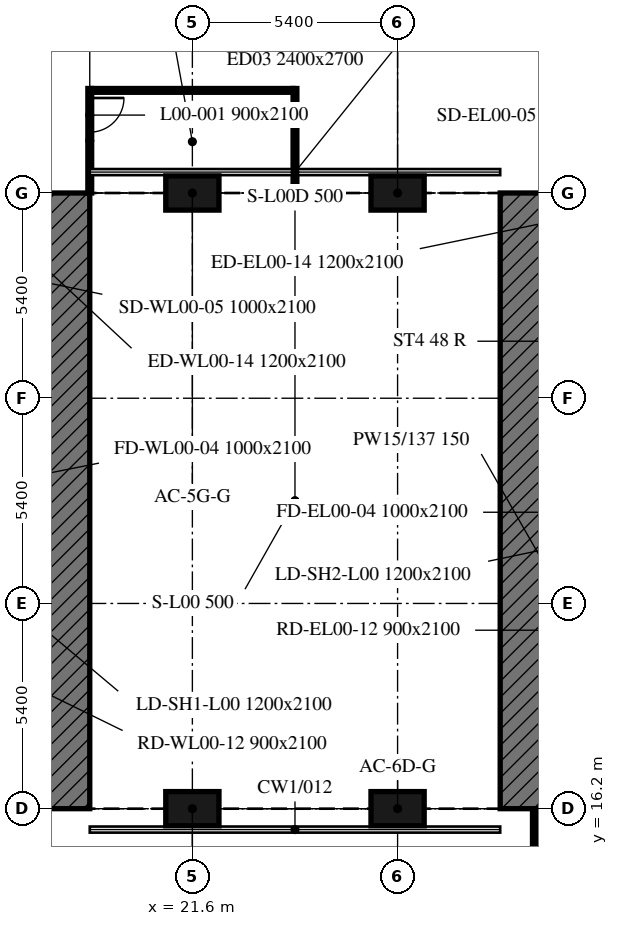
"""IFC4 building model, lengths in metres.
Left out: names, types, materials, properties, quantities, classifications, styles, units other than length and angle.
Written with IfcOpenShell. Run it as: python <this file> out.ifc"""

import sys

from ifc_helpers import new_model, si_unit, direction, frame, frame_2d, origin, origin_2d, place, context, subcontext, project, spatial, rectangle, extrude, element, fill, save


model = new_model("IFC4")
c1 = context("Model", 3, precision=1e-05, world=origin(), true_north=direction((0.0, 1.0)))
c2 = subcontext(c1, "Body", "Model", "MODEL_VIEW")
j1 = project(units=[si_unit("LENGTHUNIT", "METRE"), si_unit("PLANEANGLEUNIT", "RADIAN")], contexts=[c1])
p1 = place(None, origin())
s1 = spatial("IfcSite", under=j1, at=p1, CompositionType="ELEMENT")
p2 = place(p1, origin())
s2 = spatial("IfcBuilding", under=s1, at=p2, CompositionType="ELEMENT")
p3 = place(p2, origin())
s3 = spatial("IfcBuildingStorey", under=s2, at=p3, CompositionType="ELEMENT", Elevation=0.0)
for number, where, z_axis, x_axis in (
    (1, (21.6, 16.2, 0.0), (0.0, 0.0, 1.0), (1.0, 0.0, 0.0)),
    (2, (27.0, 16.2, 0.0), (0.0, 0.0, 1.0), (1.0, 0.0, 0.0)),
    (3, (21.6, 32.4, 0.0), (0.0, 0.0, 1.0), (1.0, 0.0, 0.0)),
    (4, (27.0, 32.4, 0.0), (0.0, 0.0, 1.0), (1.0, 0.0, 0.0)),
):
    element("IfcColumn", number, at=place(p3, frame(where, z_axis=z_axis, x_axis=x_axis)), inside=s3, PredefinedType="COLUMN", context=c2, shape_type="SweptSolid", body=[
        extrude(rectangle(XDim=1.4, YDim=0.9, at=origin_2d()), origin(), (0.0, 0.0, 1.0), 8.0),
    ])
for number, where, z_axis, x_axis in (
    (5, (18.3, 32.4, 0.0), (0.0, 0.0, 1.0), (0.0, -1.0, 0.0)),
    (6, (30.3, 16.2, 0.0), (0.0, 0.0, 1.0), (0.0, 1.0, 0.0)),
):
    element("IfcWall", number, at=place(p3, frame(where, z_axis=z_axis, x_axis=x_axis)), inside=s3, PredefinedType="SOLIDWALL", context=c2, shape_type="SweptSolid", body=[
        extrude(rectangle(XDim=16.2, YDim=1.2, at=frame_2d((8.1, 0.0))), origin(), (0.0, 0.0, 1.0), 8.0),
    ])
p4 = place(p3, frame((18.9, 35.15, 0.0), z_axis=(0.0, 0.0, 1.0), x_axis=(0.0, -1.0, 0.0)))
e7 = element("IfcWall", 7, at=p4, inside=s3, PredefinedType="PARTITIONING", context=c2, shape_type="SweptSolid", body=[
    extrude(rectangle(XDim=2.75, YDim=0.1, at=frame_2d((1.375, 0.0))), origin(), (0.0, 0.0, 1.0), 8.0),
])
p5 = place(p4, frame((0.25, 0.0, 0.0)))
e8 = element("IfcOpeningElement", 8, at=p5, cuts=e7, PredefinedType="OPENING", context=c2, shape_type="SweptSolid", body=[
    extrude(rectangle(XDim=0.9, YDim=2.1, at=frame_2d((0.45, 1.05))), frame((0.0, 0.05, 0.0), z_axis=(0.0, -1.0, 0.0), x_axis=(1.0, 0.0, 0.0)), (0.0, 0.0, 1.0), 0.1),
])
p6 = place(p3, frame((24.3, 32.4, 0.0), z_axis=(0.0, 0.0, 1.0), x_axis=(0.0, 1.0, 0.0)))
e9 = element("IfcWall", 9, at=p6, inside=s3, PredefinedType="PARTITIONING", context=c2, shape_type="SweptSolid", body=[
    extrude(rectangle(XDim=2.75, YDim=0.1, at=frame_2d((1.375, 0.0))), origin(), (0.0, 0.0, 1.0), 8.0),
])
p7 = place(p3, frame((24.25, 35.1, 0.0), z_axis=(0.0, 0.0, 1.0), x_axis=(-1.0, 0.0, 0.0)))
e10 = element("IfcWall", 10, at=p7, inside=s3, PredefinedType="PARTITIONING", context=c2, shape_type="SweptSolid", body=[
    extrude(rectangle(XDim=5.3, YDim=0.1, at=frame_2d((2.65, 0.0))), origin(), (0.0, 0.0, 1.0), 8.0),
])
p8 = place(p3, frame((30.6, 13.45, 0.0), z_axis=(0.0, 0.0, 1.0), x_axis=(0.0, 1.0, 0.0)))
e11 = element("IfcWall", 11, at=p8, inside=s3, PredefinedType="PARTITIONING", context=c2, shape_type="SweptSolid", body=[
    extrude(rectangle(XDim=2.75, YDim=0.1, at=frame_2d((1.375, 0.0))), origin(), (0.0, 0.0, 1.0), 8.0),
])
p9 = place(p5, origin())
e12 = element("IfcDoor", 12, at=p9, inside=s3, OperationType="SINGLE_SWING_LEFT", PredefinedType="DOOR", context=c2, shape_type="SweptSolid", body=[
    extrude(rectangle(XDim=0.9, YDim=2.1, at=frame_2d((0.45, 1.05))), frame((0.0, 0.025, 0.0), z_axis=(0.0, -1.0, 0.0), x_axis=(1.0, 0.0, 0.0)), (0.0, 0.0, 1.0), 0.05),
])
fill(e8, e12)
save(model, sys.argv[1])
